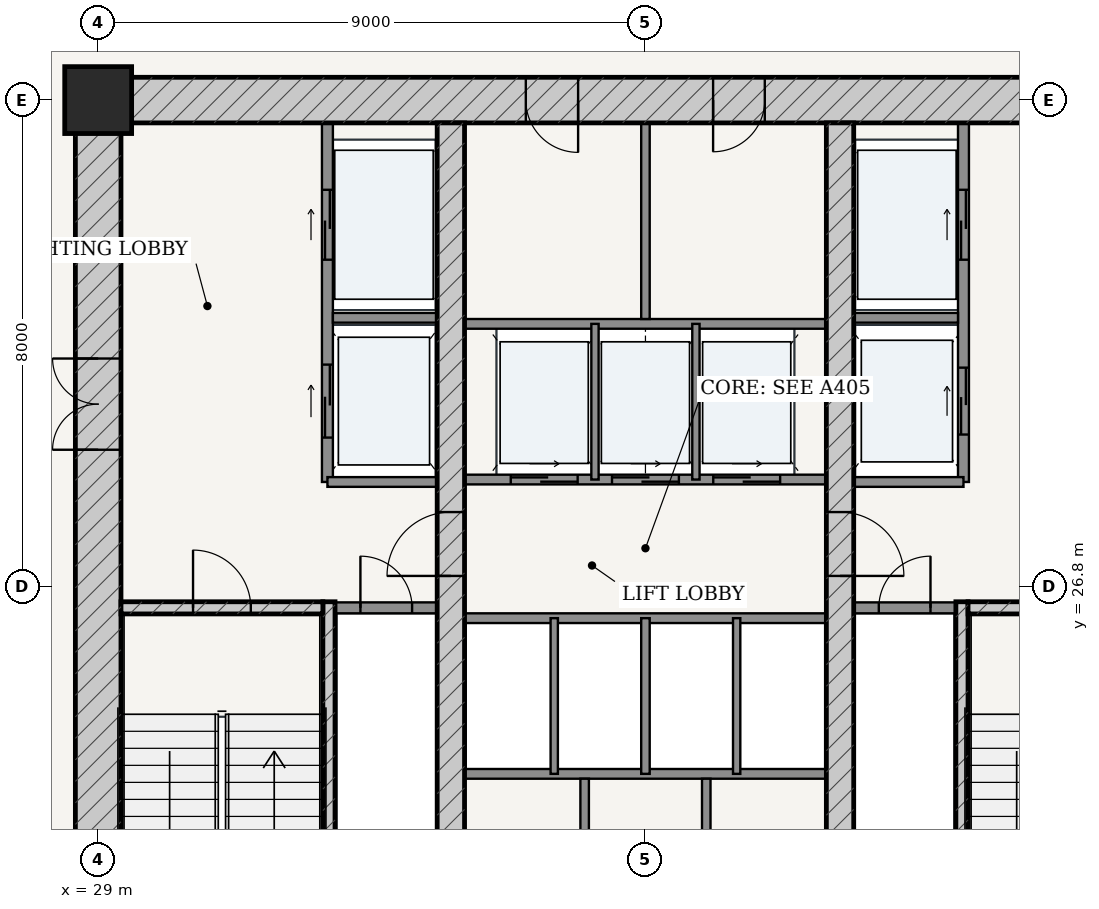
"""IFC4 building model, lengths in metres.
Left out: names, types, materials, properties, quantities, classifications, styles, units other than length and angle.
Written with IfcOpenShell. Run it as: python <this file> out.ifc"""

import sys

from ifc_helpers import new_model, si_unit, direction, frame, frame_2d, origin, origin_2d, place, context, subcontext, project, spatial, rectangle, extrude, source, transform, mapped, element, fill, save


model = new_model("IFC4")
c1 = context("Model", 3, precision=1e-05, world=origin(), true_north=direction((-0.2419218956, 0.970295726276)))
c2 = subcontext(c1, "Body", "Model", "MODEL_VIEW")
j1 = project(units=[si_unit("LENGTHUNIT", "METRE"), si_unit("PLANEANGLEUNIT", "RADIAN")], contexts=[c1])
p1 = place(None, origin())
s1 = spatial("IfcSite", under=j1, at=p1, CompositionType="ELEMENT")
p2 = place(p1, origin())
s2 = spatial("IfcBuilding", under=s1, at=p2, CompositionType="ELEMENT")
p3 = place(p2, frame((0.0, 0.0, 9.9)))
s3 = spatial("IfcBuildingStorey", under=s2, at=p3, CompositionType="ELEMENT", Elevation=9.9)
p4 = place(p3, frame((29.0, 34.8, 0.0), z_axis=(0.0, 0.0, 1.0), x_axis=(1.0, 0.0, 0.0)))
e1 = element("IfcColumn", 1, at=p4, inside=s3, PredefinedType="COLUMN", context=c2, shape_type="SweptSolid", body=[
    extrude(rectangle(XDim=1.1, YDim=1.1, at=origin_2d()), origin(), (0.0, 0.0, 1.0), 4.5),
])
p5 = place(p3, frame((28.625, 34.8, 0.0), z_axis=(0.0, 0.0, 1.0), x_axis=(1.0, 0.0, 0.0)))
e2 = element("IfcWall", 2, at=p5, inside=s3, PredefinedType="SHEAR", context=c2, shape_type="SweptSolid", body=[
    extrude(rectangle(XDim=18.75, YDim=0.75, at=frame_2d((9.375, 0.0))), origin(), (0.0, 0.0, 1.0), 4.2),
])
p6 = place(p5, frame((7.407, 0.0, 0.0)))
e3 = element("IfcOpeningElement", 3, at=p6, cuts=e2, PredefinedType="OPENING", context=c2, shape_type="SweptSolid", body=[
    extrude(rectangle(XDim=0.86, YDim=2.1, at=frame_2d((0.43, 1.05))), frame((0.0, 0.385, 0.0), z_axis=(0.0, -1.0, 0.0), x_axis=(1.0, 0.0, 0.0)), (0.0, 0.0, 1.0), 0.77),
])
p7 = place(p5, frame((10.488, 0.0, 0.0)))
e4 = element("IfcOpeningElement", 4, at=p7, cuts=e2, PredefinedType="OPENING", context=c2, shape_type="SweptSolid", body=[
    extrude(rectangle(XDim=0.85, YDim=2.1, at=frame_2d((0.425, 1.05))), frame((0.0, 0.385, 0.0), z_axis=(0.0, -1.0, 0.0), x_axis=(1.0, 0.0, 0.0)), (0.0, 0.0, 1.0), 0.77),
])
p8 = place(p3, frame((29.0, 19.175, 0.0), z_axis=(0.0, 0.0, 1.0), x_axis=(0.0, 1.0, 0.0)))
e5 = element("IfcWall", 5, at=p8, inside=s3, PredefinedType="SHEAR", context=c2, shape_type="SweptSolid", body=[
    extrude(rectangle(XDim=15.25, YDim=0.75, at=frame_2d((7.625, 0.0))), origin(), (0.0, 0.0, 1.0), 4.2),
])
p9 = place(p8, frame((9.875, 0.0, 0.0)))
e6 = element("IfcOpeningElement", 6, at=p9, cuts=e5, PredefinedType="OPENING", context=c2, shape_type="SweptSolid", body=[
    extrude(rectangle(XDim=1.5, YDim=2.2, at=frame_2d((0.75, 1.1))), frame((0.0, 0.385, 0.0), z_axis=(0.0, -1.0, 0.0), x_axis=(1.0, 0.0, 0.0)), (0.0, 0.0, 1.0), 0.77),
])
p10 = place(p3, frame((32.795, 19.175, 0.0), z_axis=(0.0, 0.0, 1.0), x_axis=(0.0, 1.0, 0.0)))
e7 = element("IfcWall", 7, at=p10, inside=s3, PredefinedType="SOLIDWALL", context=c2, shape_type="SweptSolid", body=[
    extrude(rectangle(XDim=7.375, YDim=0.2, at=frame_2d((3.688, 0.0))), origin(), (0.0, 0.0, 1.0), 4.2),
])
p11 = place(p3, frame((29.375, 26.45, 0.0), z_axis=(0.0, 0.0, 1.0), x_axis=(1.0, 0.0, 0.0)))
e8 = element("IfcWall", 8, at=p11, inside=s3, PredefinedType="SOLIDWALL", context=c2, shape_type="SweptSolid", body=[
    extrude(rectangle(XDim=3.32, YDim=0.2, at=frame_2d((1.66, 0.0))), origin(), (0.0, 0.0, 1.0), 4.2),
])
p12 = place(p11, frame((1.185, 0.0, 0.0)))
e9 = element("IfcOpeningElement", 9, at=p12, cuts=e8, PredefinedType="OPENING", context=c2, shape_type="SweptSolid", body=[
    extrude(rectangle(XDim=0.95, YDim=2.15, at=frame_2d((0.475, 1.075))), frame((0.0, 0.11, 0.0), z_axis=(0.0, -1.0, 0.0), x_axis=(1.0, 0.0, 0.0)), (0.0, 0.0, 1.0), 0.22),
])
p13 = place(p3, frame((43.205, 19.175, 0.0), z_axis=(0.0, 0.0, 1.0), x_axis=(0.0, 1.0, 0.0)))
e10 = element("IfcWall", 10, at=p13, inside=s3, PredefinedType="SOLIDWALL", context=c2, shape_type="SweptSolid", body=[
    extrude(rectangle(XDim=7.375, YDim=0.2, at=frame_2d((3.688, 0.0))), origin(), (0.0, 0.0, 1.0), 4.2),
])
p14 = place(p3, frame((43.305, 26.45, 0.0), z_axis=(0.0, 0.0, 1.0), x_axis=(1.0, 0.0, 0.0)))
e11 = element("IfcWall", 11, at=p14, inside=s3, PredefinedType="SOLIDWALL", context=c2, shape_type="SweptSolid", body=[
    extrude(rectangle(XDim=3.32, YDim=0.2, at=frame_2d((1.66, 0.0))), origin(), (0.0, 0.0, 1.0), 4.2),
])
p15 = place(p14, frame((1.185, 0.0, 0.0)))
e12 = element("IfcOpeningElement", 12, at=p15, cuts=e11, PredefinedType="OPENING", context=c2, shape_type="SweptSolid", body=[
    extrude(rectangle(XDim=0.95, YDim=2.15, at=frame_2d((0.475, 1.075))), frame((0.0, 0.11, 0.0), z_axis=(0.0, -1.0, 0.0), x_axis=(1.0, 0.0, 0.0)), (0.0, 0.0, 1.0), 0.22),
])
p16 = place(p3, frame((34.8, 19.175, 0.0), z_axis=(0.0, 0.0, 1.0), x_axis=(0.0, 1.0, 0.0)))
e13 = element("IfcWall", 13, at=p16, inside=s3, PredefinedType="SHEAR", context=c2, shape_type="SweptSolid", body=[
    extrude(rectangle(XDim=15.25, YDim=0.45, at=frame_2d((7.625, 0.0))), origin(), (0.0, 0.0, 1.0), 4.2),
])
p17 = place(p16, frame((7.8, 0.0, 0.0)))
e14 = element("IfcOpeningElement", 14, at=p17, cuts=e13, PredefinedType="OPENING", context=c2, shape_type="SweptSolid", body=[
    extrude(rectangle(XDim=1.05, YDim=2.15, at=frame_2d((0.525, 1.075))), frame((0.0, 0.235, 0.0), z_axis=(0.0, -1.0, 0.0), x_axis=(1.0, 0.0, 0.0)), (0.0, 0.0, 1.0), 0.47),
])
p18 = place(p3, frame((41.2, 19.175, 0.0), z_axis=(0.0, 0.0, 1.0), x_axis=(0.0, 1.0, 0.0)))
e15 = element("IfcWall", 15, at=p18, inside=s3, PredefinedType="SHEAR", context=c2, shape_type="SweptSolid", body=[
    extrude(rectangle(XDim=15.25, YDim=0.45, at=frame_2d((7.625, 0.0))), origin(), (0.0, 0.0, 1.0), 4.2),
])
p19 = place(p18, frame((7.8, 0.0, 0.0)))
e16 = element("IfcOpeningElement", 16, at=p19, cuts=e15, PredefinedType="OPENING", context=c2, shape_type="SweptSolid", body=[
    extrude(rectangle(XDim=1.05, YDim=2.15, at=frame_2d((0.525, 1.075))), frame((0.0, 0.235, 0.0), z_axis=(0.0, -1.0, 0.0), x_axis=(1.0, 0.0, 0.0)), (0.0, 0.0, 1.0), 0.47),
])
p20 = place(p3, frame((32.9, 26.45, 0.0), z_axis=(0.0, 0.0, 1.0), x_axis=(1.0, 0.0, 0.0)))
e17 = element("IfcWall", 17, at=p20, inside=s3, PredefinedType="PARTITIONING", context=c2, shape_type="SweptSolid", body=[
    extrude(rectangle(XDim=1.675, YDim=0.18, at=frame_2d((0.837, 0.0))), origin(), (0.0, 0.0, 1.0), 4.2),
])
p21 = place(p20, frame((0.413, 0.0, 0.0)))
e18 = element("IfcOpeningElement", 18, at=p21, cuts=e17, PredefinedType="OPENING", context=c2, shape_type="SweptSolid", body=[
    extrude(rectangle(XDim=0.85, YDim=2.1, at=frame_2d((0.425, 1.05))), frame((0.0, 0.1, 0.0), z_axis=(0.0, -1.0, 0.0), x_axis=(1.0, 0.0, 0.0)), (0.0, 0.0, 1.0), 0.2),
])
p22 = place(p3, frame((41.425, 26.45, 0.0), z_axis=(0.0, 0.0, 1.0), x_axis=(1.0, 0.0, 0.0)))
e19 = element("IfcWall", 19, at=p22, inside=s3, PredefinedType="PARTITIONING", context=c2, shape_type="SweptSolid", body=[
    extrude(rectangle(XDim=1.675, YDim=0.18, at=frame_2d((0.837, 0.0))), origin(), (0.0, 0.0, 1.0), 4.2),
])
p23 = place(p22, frame((0.413, 0.0, 0.0)))
e20 = element("IfcOpeningElement", 20, at=p23, cuts=e19, PredefinedType="OPENING", context=c2, shape_type="SweptSolid", body=[
    extrude(rectangle(XDim=0.85, YDim=2.1, at=frame_2d((0.425, 1.05))), frame((0.0, 0.1, 0.0), z_axis=(0.0, -1.0, 0.0), x_axis=(1.0, 0.0, 0.0)), (0.0, 0.0, 1.0), 0.2),
])
p24 = place(p3, frame((32.77, 28.52, 0.0), z_axis=(0.0, 0.0, 1.0), x_axis=(0.0, 1.0, 0.0)))
e21 = element("IfcWall", 21, at=p24, inside=s3, PredefinedType="PARTITIONING", context=c2, shape_type="SweptSolid", body=[
    extrude(rectangle(XDim=5.905, YDim=0.18, at=frame_2d((2.953, 0.0))), origin(), (0.0, 0.0, 1.0), 4.2),
])
p25 = place(p24, frame((3.655, 0.0, 0.0)))
e22 = element("IfcOpeningElement", 22, at=p25, cuts=e21, PredefinedType="OPENING", context=c2, shape_type="SweptSolid", body=[
    extrude(rectangle(XDim=1.15, YDim=2.2, at=frame_2d((0.575, 1.1))), frame((0.0, 0.1, 0.0), z_axis=(0.0, -1.0, 0.0), x_axis=(1.0, 0.0, 0.0)), (0.0, 0.0, 1.0), 0.2),
])
p26 = place(p24, frame((0.73, 0.0, 0.0)))
e23 = element("IfcOpeningElement", 23, at=p26, cuts=e21, PredefinedType="OPENING", context=c2, shape_type="SweptSolid", body=[
    extrude(rectangle(XDim=1.2, YDim=2.25, at=frame_2d((0.6, 1.125))), frame((0.0, 0.1, 0.0), z_axis=(0.0, -1.0, 0.0), x_axis=(1.0, 0.0, 0.0)), (0.0, 0.0, 1.0), 0.2),
])
p27 = place(p3, frame((32.86, 31.22, 0.0), z_axis=(0.0, 0.0, 1.0), x_axis=(1.0, 0.0, 0.0)))
e24 = element("IfcWall", 24, at=p27, inside=s3, PredefinedType="PARTITIONING", context=c2, shape_type="SweptSolid", body=[
    extrude(rectangle(XDim=1.715, YDim=0.16, at=frame_2d((0.857, 0.0))), origin(), (0.0, 0.0, 1.0), 4.2),
])
p28 = place(p3, frame((32.77, 28.52, 0.0), z_axis=(0.0, 0.0, 1.0), x_axis=(1.0, 0.0, 0.0)))
e25 = element("IfcWall", 25, at=p28, inside=s3, PredefinedType="PARTITIONING", context=c2, shape_type="SweptSolid", body=[
    extrude(rectangle(XDim=1.805, YDim=0.16, at=frame_2d((0.902, 0.0))), origin(), (0.0, 0.0, 1.0), 4.2),
])
p29 = place(p3, frame((43.23, 28.52, 0.0), z_axis=(0.0, 0.0, 1.0), x_axis=(0.0, 1.0, 0.0)))
e26 = element("IfcWall", 26, at=p29, inside=s3, PredefinedType="PARTITIONING", context=c2, shape_type="SweptSolid", body=[
    extrude(rectangle(XDim=5.905, YDim=0.18, at=frame_2d((2.953, 0.0))), origin(), (0.0, 0.0, 1.0), 4.2),
])
p30 = place(p29, frame((3.655, 0.0, 0.0)))
e27 = element("IfcOpeningElement", 27, at=p30, cuts=e26, PredefinedType="OPENING", context=c2, shape_type="SweptSolid", body=[
    extrude(rectangle(XDim=1.15, YDim=2.2, at=frame_2d((0.575, 1.1))), frame((0.0, 0.1, 0.0), z_axis=(0.0, -1.0, 0.0), x_axis=(1.0, 0.0, 0.0)), (0.0, 0.0, 1.0), 0.2),
])
p31 = place(p29, frame((0.78, 0.0, 0.0)))
e28 = element("IfcOpeningElement", 28, at=p31, cuts=e26, PredefinedType="OPENING", context=c2, shape_type="SweptSolid", body=[
    extrude(rectangle(XDim=1.1, YDim=2.2, at=frame_2d((0.55, 1.1))), frame((0.0, 0.1, 0.0), z_axis=(0.0, -1.0, 0.0), x_axis=(1.0, 0.0, 0.0)), (0.0, 0.0, 1.0), 0.2),
])
p32 = place(p3, frame((41.425, 31.22, 0.0), z_axis=(0.0, 0.0, 1.0), x_axis=(1.0, 0.0, 0.0)))
e29 = element("IfcWall", 29, at=p32, inside=s3, PredefinedType="PARTITIONING", context=c2, shape_type="SweptSolid", body=[
    extrude(rectangle(XDim=1.715, YDim=0.16, at=frame_2d((0.857, 0.0))), origin(), (0.0, 0.0, 1.0), 4.2),
])
p33 = place(p3, frame((41.425, 28.52, 0.0), z_axis=(0.0, 0.0, 1.0), x_axis=(1.0, 0.0, 0.0)))
e30 = element("IfcWall", 30, at=p33, inside=s3, PredefinedType="PARTITIONING", context=c2, shape_type="SweptSolid", body=[
    extrude(rectangle(XDim=1.805, YDim=0.16, at=frame_2d((0.902, 0.0))), origin(), (0.0, 0.0, 1.0), 4.2),
])
p34 = place(p3, frame((35.025, 28.56, 0.0), z_axis=(0.0, 0.0, 1.0), x_axis=(1.0, 0.0, 0.0)))
e31 = element("IfcWall", 31, at=p34, inside=s3, PredefinedType="PARTITIONING", context=c2, shape_type="SweptSolid", body=[
    extrude(rectangle(XDim=5.95, YDim=0.16, at=frame_2d((2.975, 0.0))), origin(), (0.0, 0.0, 1.0), 4.2),
])
p35 = place(p34, frame((0.76, 0.0, 0.0)))
e32 = element("IfcOpeningElement", 32, at=p35, cuts=e31, PredefinedType="OPENING", context=c2, shape_type="SweptSolid", body=[
    extrude(rectangle(XDim=1.1, YDim=2.2, at=frame_2d((0.55, 1.1))), frame((0.0, 0.09, 0.0), z_axis=(0.0, -1.0, 0.0), x_axis=(1.0, 0.0, 0.0)), (0.0, 0.0, 1.0), 0.18),
])
p36 = place(p34, frame((2.425, 0.0, 0.0)))
e33 = element("IfcOpeningElement", 33, at=p36, cuts=e31, PredefinedType="OPENING", context=c2, shape_type="SweptSolid", body=[
    extrude(rectangle(XDim=1.1, YDim=2.2, at=frame_2d((0.55, 1.1))), frame((0.0, 0.09, 0.0), z_axis=(0.0, -1.0, 0.0), x_axis=(1.0, 0.0, 0.0)), (0.0, 0.0, 1.0), 0.18),
])
p37 = place(p34, frame((4.09, 0.0, 0.0)))
e34 = element("IfcOpeningElement", 34, at=p37, cuts=e31, PredefinedType="OPENING", context=c2, shape_type="SweptSolid", body=[
    extrude(rectangle(XDim=1.1, YDim=2.2, at=frame_2d((0.55, 1.1))), frame((0.0, 0.09, 0.0), z_axis=(0.0, -1.0, 0.0), x_axis=(1.0, 0.0, 0.0)), (0.0, 0.0, 1.0), 0.18),
])
p38 = place(p3, frame((35.025, 31.12, 0.0), z_axis=(0.0, 0.0, 1.0), x_axis=(1.0, 0.0, 0.0)))
e35 = element("IfcWall", 35, at=p38, inside=s3, PredefinedType="PARTITIONING", context=c2, shape_type="SweptSolid", body=[
    extrude(rectangle(XDim=5.95, YDim=0.16, at=frame_2d((2.975, 0.0))), origin(), (0.0, 0.0, 1.0), 4.2),
])
for number, where, z_axis, x_axis in (
    (36, (37.17, 28.56, 0.0), (0.0, 0.0, 1.0), (0.0, 1.0, 0.0)),
    (37, (38.83, 28.56, 0.0), (0.0, 0.0, 1.0), (0.0, 1.0, 0.0)),
):
    element("IfcWall", number, at=place(p3, frame(where, z_axis=z_axis, x_axis=x_axis)), inside=s3, PredefinedType="PARTITIONING", context=c2, shape_type="SweptSolid", body=[
        extrude(rectangle(XDim=2.56, YDim=0.12, at=frame_2d((1.28, 0.0))), origin(), (0.0, 0.0, 1.0), 4.2),
    ])
p39 = place(p3, frame((38.0, 31.2, 0.0), z_axis=(0.0, 0.0, 1.0), x_axis=(0.0, 1.0, 0.0)))
e38 = element("IfcWall", 38, at=p39, inside=s3, PredefinedType="PARTITIONING", context=c2, shape_type="SweptSolid", body=[
    extrude(rectangle(XDim=3.225, YDim=0.14, at=frame_2d((1.613, 0.0))), origin(), (0.0, 0.0, 1.0), 4.2),
])
for number, where, z_axis, x_axis in (
    (39, (35.025, 26.28, 0.0), (0.0, 0.0, 1.0), (1.0, 0.0, 0.0)),
    (40, (35.025, 23.72, 0.0), (0.0, 0.0, 1.0), (1.0, 0.0, 0.0)),
):
    element("IfcWall", number, at=place(p3, frame(where, z_axis=z_axis, x_axis=x_axis)), inside=s3, PredefinedType="PARTITIONING", context=c2, shape_type="SweptSolid", body=[
        extrude(rectangle(XDim=5.95, YDim=0.16, at=frame_2d((2.975, 0.0))), origin(), (0.0, 0.0, 1.0), 4.2),
    ])
p40 = place(p3, frame((36.5, 23.72, 0.0), z_axis=(0.0, 0.0, 1.0), x_axis=(0.0, 1.0, 0.0)))
e41 = element("IfcWall", 41, at=p40, inside=s3, PredefinedType="PARTITIONING", context=c2, shape_type="SweptSolid", body=[
    extrude(rectangle(XDim=2.56, YDim=0.12, at=frame_2d((1.28, 0.0))), origin(), (0.0, 0.0, 1.0), 4.2),
])
p41 = place(p3, frame((38.0, 23.72, 0.0), z_axis=(0.0, 0.0, 1.0), x_axis=(0.0, 1.0, 0.0)))
e42 = element("IfcWall", 42, at=p41, inside=s3, PredefinedType="PARTITIONING", context=c2, shape_type="SweptSolid", body=[
    extrude(rectangle(XDim=2.56, YDim=0.14, at=frame_2d((1.28, 0.0))), origin(), (0.0, 0.0, 1.0), 4.2),
])
p42 = place(p3, frame((39.5, 23.72, 0.0), z_axis=(0.0, 0.0, 1.0), x_axis=(0.0, 1.0, 0.0)))
e43 = element("IfcWall", 43, at=p42, inside=s3, PredefinedType="PARTITIONING", context=c2, shape_type="SweptSolid", body=[
    extrude(rectangle(XDim=2.56, YDim=0.12, at=frame_2d((1.28, 0.0))), origin(), (0.0, 0.0, 1.0), 4.2),
])
p43 = place(p3, frame((37.0, 19.175, 0.0), z_axis=(0.0, 0.0, 1.0), x_axis=(0.0, 1.0, 0.0)))
e44 = element("IfcWall", 44, at=p43, inside=s3, PredefinedType="PARTITIONING", context=c2, shape_type="SweptSolid", body=[
    extrude(rectangle(XDim=4.465, YDim=0.14, at=frame_2d((2.232, 0.0))), origin(), (0.0, 0.0, 1.0), 4.2),
])
p44 = place(p43, frame((1.808, 0.0, 0.0)))
e45 = element("IfcOpeningElement", 45, at=p44, cuts=e44, PredefinedType="OPENING", context=c2, shape_type="SweptSolid", body=[
    extrude(rectangle(XDim=0.85, YDim=2.1, at=frame_2d((0.425, 1.05))), frame((0.0, 0.08, 0.0), z_axis=(0.0, -1.0, 0.0), x_axis=(1.0, 0.0, 0.0)), (0.0, 0.0, 1.0), 0.16),
])
p45 = place(p3, frame((39.0, 19.175, 0.0), z_axis=(0.0, 0.0, 1.0), x_axis=(0.0, 1.0, 0.0)))
e46 = element("IfcWall", 46, at=p45, inside=s3, PredefinedType="PARTITIONING", context=c2, shape_type="SweptSolid", body=[
    extrude(rectangle(XDim=4.465, YDim=0.14, at=frame_2d((2.232, 0.0))), origin(), (0.0, 0.0, 1.0), 4.2),
])
p46 = place(p45, frame((1.808, 0.0, 0.0)))
e47 = element("IfcOpeningElement", 47, at=p46, cuts=e46, PredefinedType="OPENING", context=c2, shape_type="SweptSolid", body=[
    extrude(rectangle(XDim=0.85, YDim=2.1, at=frame_2d((0.425, 1.05))), frame((0.0, 0.08, 0.0), z_axis=(0.0, -1.0, 0.0), x_axis=(1.0, 0.0, 0.0)), (0.0, 0.0, 1.0), 0.16),
])
m1 = source(origin(), c2, "Body", "SweptSolid", [
    extrude(rectangle(XDim=1.5, YDim=2.2, at=frame_2d((0.75, 1.1))), frame((0.0, 0.025, 0.0), z_axis=(0.0, -1.0, 0.0), x_axis=(1.0, 0.0, 0.0)), (0.0, 0.0, 1.0), 0.05),
])
p47 = place(p9, origin())
e48 = element("IfcDoor", 48, at=p47, inside=s3, OperationType="DOUBLE_DOOR_SINGLE_SWING", PredefinedType="DOOR", context=c2, shape_type="MappedRepresentation", body=[
    mapped(m1, transform((0.0, 0.0, 0.0), scale=1.0)),
])
fill(e6, e48)
m2 = source(origin(), c2, "Body", "SweptSolid", [
    extrude(rectangle(XDim=1.05, YDim=2.15, at=frame_2d((0.525, 1.075))), frame((0.0, 0.025, 0.0), z_axis=(0.0, -1.0, 0.0), x_axis=(1.0, 0.0, 0.0)), (0.0, 0.0, 1.0), 0.05),
])
p48 = place(p17, origin())
e49 = element("IfcDoor", 49, at=p48, inside=s3, OperationType="SINGLE_SWING_LEFT", PredefinedType="DOOR", context=c2, shape_type="MappedRepresentation", body=[
    mapped(m2, transform((0.0, 0.0, 0.0), scale=1.0)),
])
fill(e14, e49)
p49 = place(p19, frame((1.05, 0.0, 0.0), z_axis=(0.0, 0.0, 1.0), x_axis=(-1.0, 0.0, 0.0)))
e50 = element("IfcDoor", 50, at=p49, inside=s3, OperationType="SINGLE_SWING_RIGHT", PredefinedType="DOOR", context=c2, shape_type="MappedRepresentation", body=[
    mapped(m2, transform((0.0, 0.0, 0.0), scale=1.0)),
])
fill(e16, e50)
m3 = source(origin(), c2, "Body", "SweptSolid", [
    extrude(rectangle(XDim=0.95, YDim=2.15, at=frame_2d((0.475, 1.075))), frame((0.0, 0.025, 0.0), z_axis=(0.0, -1.0, 0.0), x_axis=(1.0, 0.0, 0.0)), (0.0, 0.0, 1.0), 0.05),
])
p50 = place(p12, origin())
e51 = element("IfcDoor", 51, at=p50, inside=s3, OperationType="SINGLE_SWING_LEFT", PredefinedType="DOOR", context=c2, shape_type="MappedRepresentation", body=[
    mapped(m3, transform((0.0, 0.0, 0.0), scale=1.0)),
])
fill(e9, e51)
m4 = source(origin(), c2, "Body", "SweptSolid", [
    extrude(rectangle(XDim=0.85, YDim=2.1, at=frame_2d((0.425, 1.05))), frame((0.0, 0.025, 0.0), z_axis=(0.0, -1.0, 0.0), x_axis=(1.0, 0.0, 0.0)), (0.0, 0.0, 1.0), 0.05),
])
p51 = place(p21, origin())
e52 = element("IfcDoor", 52, at=p51, inside=s3, OperationType="SINGLE_SWING_LEFT", PredefinedType="DOOR", context=c2, shape_type="MappedRepresentation", body=[
    mapped(m4, transform((0.0, 0.0, 0.0), scale=1.0)),
])
fill(e18, e52)
p52 = place(p23, origin())
e53 = element("IfcDoor", 53, at=p52, inside=s3, OperationType="SINGLE_SWING_RIGHT", PredefinedType="DOOR", context=c2, shape_type="MappedRepresentation", body=[
    mapped(m4, transform((0.0, 0.0, 0.0), scale=1.0)),
])
fill(e20, e53)
m5 = source(origin(), c2, "Body", "SweptSolid", [
    extrude(rectangle(XDim=0.86, YDim=2.1, at=frame_2d((0.43, 1.05))), frame((0.0, 0.025, 0.0), z_axis=(0.0, -1.0, 0.0), x_axis=(1.0, 0.0, 0.0)), (0.0, 0.0, 1.0), 0.05),
])
p53 = place(p6, frame((0.86, 0.0, 0.0), z_axis=(0.0, 0.0, 1.0), x_axis=(-1.0, 0.0, 0.0)))
e54 = element("IfcDoor", 54, at=p53, inside=s3, OperationType="SINGLE_SWING_LEFT", PredefinedType="DOOR", context=c2, shape_type="MappedRepresentation", body=[
    mapped(m5, transform((0.0, 0.0, 0.0), scale=1.0)),
])
fill(e3, e54)
p54 = place(p7, frame((0.85, 0.0, 0.0), z_axis=(0.0, 0.0, 1.0), x_axis=(-1.0, 0.0, 0.0)))
e55 = element("IfcDoor", 55, at=p54, inside=s3, OperationType="SINGLE_SWING_RIGHT", PredefinedType="DOOR", context=c2, shape_type="MappedRepresentation", body=[
    mapped(m4, transform((0.0, 0.0, 0.0), scale=1.0)),
])
fill(e4, e55)
m6 = source(origin(), c2, "Body", "SweptSolid", [
    extrude(rectangle(XDim=1.15, YDim=2.2, at=frame_2d((0.575, 1.1))), frame((0.0, 0.025, 0.0), z_axis=(0.0, -1.0, 0.0), x_axis=(1.0, 0.0, 0.0)), (0.0, 0.0, 1.0), 0.05),
])
p55 = place(p25, origin())
e56 = element("IfcDoor", 56, at=p55, inside=s3, OperationType="DOUBLE_DOOR_SLIDING", PredefinedType="DOOR", context=c2, shape_type="MappedRepresentation", body=[
    mapped(m6, transform((0.0, 0.0, 0.0), scale=1.0)),
])
fill(e22, e56)
p56 = place(p30, origin())
e57 = element("IfcDoor", 57, at=p56, inside=s3, OperationType="DOUBLE_DOOR_SLIDING", PredefinedType="DOOR", context=c2, shape_type="MappedRepresentation", body=[
    mapped(m6, transform((0.0, 0.0, 0.0), scale=1.0)),
])
fill(e27, e57)
m7 = source(origin(), c2, "Body", "SweptSolid", [
    extrude(rectangle(XDim=1.2, YDim=2.25, at=frame_2d((0.6, 1.125))), frame((0.0, 0.025, 0.0), z_axis=(0.0, -1.0, 0.0), x_axis=(1.0, 0.0, 0.0)), (0.0, 0.0, 1.0), 0.05),
])
p57 = place(p26, origin())
e58 = element("IfcDoor", 58, at=p57, inside=s3, OperationType="DOUBLE_DOOR_SLIDING", PredefinedType="DOOR", context=c2, shape_type="MappedRepresentation", body=[
    mapped(m7, transform((0.0, 0.0, 0.0), scale=1.0)),
])
fill(e23, e58)
m8 = source(origin(), c2, "Body", "SweptSolid", [
    extrude(rectangle(XDim=1.1, YDim=2.2, at=frame_2d((0.55, 1.1))), frame((0.0, 0.025, 0.0), z_axis=(0.0, -1.0, 0.0), x_axis=(1.0, 0.0, 0.0)), (0.0, 0.0, 1.0), 0.05),
])
p58 = place(p31, origin())
e59 = element("IfcDoor", 59, at=p58, inside=s3, OperationType="DOUBLE_DOOR_SLIDING", PredefinedType="DOOR", context=c2, shape_type="MappedRepresentation", body=[
    mapped(m8, transform((0.0, 0.0, 0.0), scale=1.0)),
])
fill(e28, e59)
p59 = place(p35, origin())
e60 = element("IfcDoor", 60, at=p59, inside=s3, OperationType="DOUBLE_DOOR_SLIDING", PredefinedType="DOOR", context=c2, shape_type="MappedRepresentation", body=[
    mapped(m8, transform((0.0, 0.0, 0.0), scale=1.0)),
])
fill(e32, e60)
p60 = place(p36, origin())
e61 = element("IfcDoor", 61, at=p60, inside=s3, OperationType="DOUBLE_DOOR_SLIDING", PredefinedType="DOOR", context=c2, shape_type="MappedRepresentation", body=[
    mapped(m8, transform((0.0, 0.0, 0.0), scale=1.0)),
])
fill(e33, e61)
p61 = place(p37, origin())
e62 = element("IfcDoor", 62, at=p61, inside=s3, OperationType="DOUBLE_DOOR_SLIDING", PredefinedType="DOOR", context=c2, shape_type="MappedRepresentation", body=[
    mapped(m8, transform((0.0, 0.0, 0.0), scale=1.0)),
])
fill(e34, e62)
save(model, sys.argv[1])
